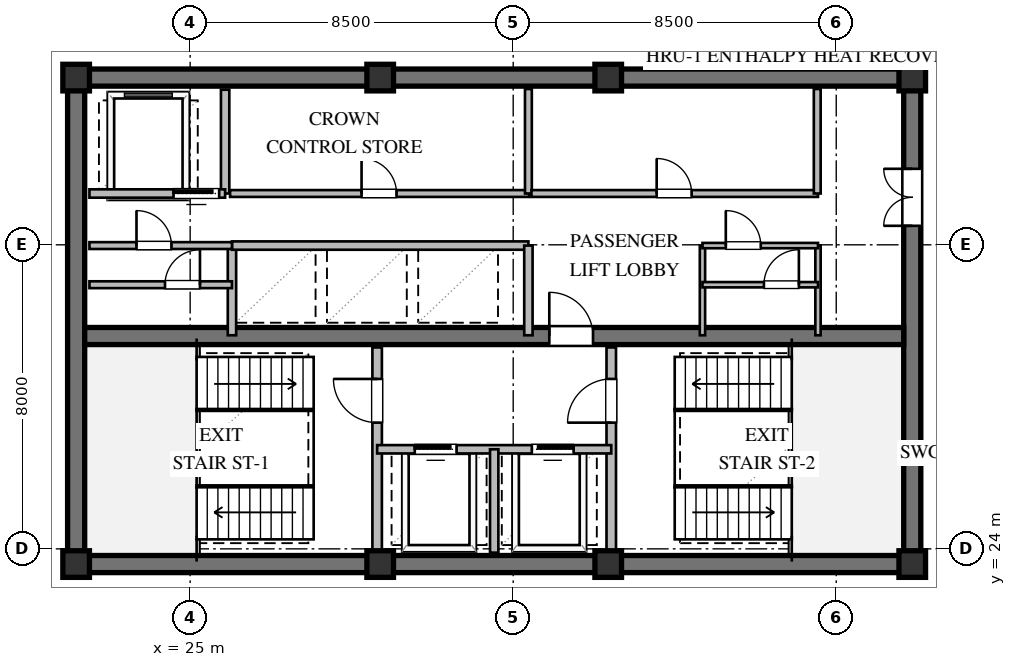
"""IFC4 building model, lengths in metres.
Left out: names, types, materials, properties, quantities, classifications, styles, units other than length and angle.
Written with IfcOpenShell. Run it as: python <this file> out.ifc"""

import sys

from ifc_helpers import new_model, si_unit, direction, frame, frame_2d, origin, origin_2d, place, context, subcontext, project, spatial, rectangle, extrude, element, fill, save


model = new_model("IFC4")
c1 = context("Model", 3, precision=1e-05, world=origin(), true_north=direction((0.0, 1.0)))
c2 = subcontext(c1, "Body", "Model", "MODEL_VIEW")
j1 = project(units=[si_unit("LENGTHUNIT", "METRE"), si_unit("PLANEANGLEUNIT", "RADIAN")], contexts=[c1])
p1 = place(None, origin())
s1 = spatial("IfcSite", under=j1, at=p1, CompositionType="ELEMENT")
p2 = place(p1, origin())
s2 = spatial("IfcBuilding", under=s1, at=p2, CompositionType="ELEMENT")
p3 = place(p2, frame((0.0, 0.0, 292.8)))
s3 = spatial("IfcBuildingStorey", under=s2, at=p3, CompositionType="ELEMENT", Elevation=292.8)
for number, where, z_axis, x_axis in (
    (1, (21.775, 23.6, 0.0), (0.0, 0.0, 1.0), (1.0, 0.0, 0.0)),
    (2, (21.775, 36.4, 0.0), (0.0, 0.0, 1.0), (1.0, 0.0, 0.0)),
):
    element("IfcWall", number, at=place(p3, frame(where, z_axis=z_axis, x_axis=x_axis)), inside=s3, PredefinedType="SHEAR", context=c2, shape_type="SweptSolid", body=[
        extrude(rectangle(XDim=22.45, YDim=0.45, at=frame_2d((11.225, 0.0))), origin(), (0.0, 0.0, 1.0), 3.72),
    ])
p4 = place(p3, frame((22.0, 23.825, 0.0), z_axis=(0.0, 0.0, 1.0), x_axis=(0.0, 1.0, 0.0)))
e3 = element("IfcWall", 3, at=p4, inside=s3, PredefinedType="SHEAR", context=c2, shape_type="SweptSolid", body=[
    extrude(rectangle(XDim=12.35, YDim=0.45, at=frame_2d((6.175, 0.0))), origin(), (0.0, 0.0, 1.0), 3.72),
])
p5 = place(p3, frame((44.0, 23.825, 0.0), z_axis=(0.0, 0.0, 1.0), x_axis=(0.0, 1.0, 0.0)))
e4 = element("IfcWall", 4, at=p5, inside=s3, PredefinedType="SHEAR", context=c2, shape_type="SweptSolid", body=[
    extrude(rectangle(XDim=12.35, YDim=0.45, at=frame_2d((6.175, 0.0))), origin(), (0.0, 0.0, 1.0), 3.72),
])
p6 = place(p5, frame((8.675, 0.0, 0.0)))
e5 = element("IfcOpeningElement", 5, at=p6, cuts=e4, PredefinedType="OPENING", context=c2, shape_type="SweptSolid", body=[
    extrude(rectangle(XDim=1.5, YDim=2.15, at=frame_2d((0.75, 1.075))), frame((0.0, 0.235, 0.0), z_axis=(0.0, -1.0, 0.0), x_axis=(1.0, 0.0, 0.0)), (0.0, 0.0, 1.0), 0.47),
])
p7 = place(p3, frame((22.225, 29.6, 0.0), z_axis=(0.0, 0.0, 1.0), x_axis=(1.0, 0.0, 0.0)))
e6 = element("IfcWall", 6, at=p7, inside=s3, PredefinedType="SHEAR", context=c2, shape_type="SweptSolid", body=[
    extrude(rectangle(XDim=21.55, YDim=0.45, at=frame_2d((10.775, 0.0))), origin(), (0.0, 0.0, 1.0), 3.72),
])
p8 = place(p7, frame((12.225, 0.0, 0.0)))
e7 = element("IfcOpeningElement", 7, at=p8, cuts=e6, PredefinedType="OPENING", context=c2, shape_type="SweptSolid", body=[
    extrude(rectangle(XDim=1.15, YDim=2.1, at=frame_2d((0.575, 1.05))), frame((0.0, 0.235, 0.0), z_axis=(0.0, -1.0, 0.0), x_axis=(1.0, 0.0, 0.0)), (0.0, 0.0, 1.0), 0.47),
])
for number, where, z_axis, x_axis in (
    (8, (22.0, 23.6, 0.0), (0.0, 0.0, 1.0), (1.0, 0.0, 0.0)),
    (9, (30.0, 23.6, 0.0), (0.0, 0.0, 1.0), (1.0, 0.0, 0.0)),
    (10, (36.0, 23.6, 0.0), (0.0, 0.0, 1.0), (1.0, 0.0, 0.0)),
    (11, (44.0, 23.6, 0.0), (0.0, 0.0, 1.0), (1.0, 0.0, 0.0)),
    (12, (44.0, 36.4, 0.0), (0.0, 0.0, 1.0), (1.0, 0.0, 0.0)),
    (13, (36.0, 36.4, 0.0), (0.0, 0.0, 1.0), (1.0, 0.0, 0.0)),
    (14, (30.0, 36.4, 0.0), (0.0, 0.0, 1.0), (1.0, 0.0, 0.0)),
    (15, (22.0, 36.4, 0.0), (0.0, 0.0, 1.0), (1.0, 0.0, 0.0)),
):
    element("IfcColumn", number, at=place(p3, frame(where, z_axis=z_axis, x_axis=x_axis)), inside=s3, PredefinedType="COLUMN", context=c2, shape_type="SweptSolid", body=[
        extrude(rectangle(XDim=0.7, YDim=0.7, at=origin_2d()), origin(), (0.0, 0.0, 1.0), 4.0),
    ])
p9 = place(p3, frame((29.92, 23.9, 0.0), z_axis=(0.0, 0.0, 1.0), x_axis=(0.0, 1.0, 0.0)))
e16 = element("IfcWall", 16, at=p9, inside=s3, PredefinedType="SOLIDWALL", context=c2, shape_type="SweptSolid", body=[
    extrude(rectangle(XDim=5.4, YDim=0.25, at=frame_2d((2.7, 0.0))), origin(), (0.0, 0.0, 1.0), 3.72),
])
p10 = place(p9, frame((3.421, 0.0, 0.0)))
e17 = element("IfcOpeningElement", 17, at=p10, cuts=e16, PredefinedType="OPENING", context=c2, shape_type="SweptSolid", body=[
    extrude(rectangle(XDim=1.15, YDim=2.1, at=frame_2d((0.575, 1.05))), frame((0.0, 0.135, 0.0), z_axis=(0.0, -1.0, 0.0), x_axis=(1.0, 0.0, 0.0)), (0.0, 0.0, 1.0), 0.27),
])
p11 = place(p3, frame((36.08, 23.9, 0.0), z_axis=(0.0, 0.0, 1.0), x_axis=(0.0, 1.0, 0.0)))
e18 = element("IfcWall", 18, at=p11, inside=s3, PredefinedType="SOLIDWALL", context=c2, shape_type="SweptSolid", body=[
    extrude(rectangle(XDim=5.4, YDim=0.25, at=frame_2d((2.7, 0.0))), origin(), (0.0, 0.0, 1.0), 3.72),
])
p12 = place(p11, frame((3.421, 0.0, 0.0)))
e19 = element("IfcOpeningElement", 19, at=p12, cuts=e18, PredefinedType="OPENING", context=c2, shape_type="SweptSolid", body=[
    extrude(rectangle(XDim=1.15, YDim=2.1, at=frame_2d((0.575, 1.05))), frame((0.0, 0.135, 0.0), z_axis=(0.0, -1.0, 0.0), x_axis=(1.0, 0.0, 0.0)), (0.0, 0.0, 1.0), 0.27),
])
p13 = place(p3, frame((29.92, 26.62, 0.0), z_axis=(0.0, 0.0, 1.0), x_axis=(1.0, 0.0, 0.0)))
e20 = element("IfcWall", 20, at=p13, inside=s3, PredefinedType="SOLIDWALL", context=c2, shape_type="SweptSolid", body=[
    extrude(rectangle(XDim=6.16, YDim=0.22, at=frame_2d((3.08, 0.0))), origin(), (0.0, 0.0, 1.0), 3.72),
])
p14 = place(p13, frame((0.99, 0.0, 0.0)))
e21 = element("IfcOpeningElement", 21, at=p14, cuts=e20, PredefinedType="OPENING", context=c2, shape_type="SweptSolid", body=[
    extrude(rectangle(XDim=1.1, YDim=2.1, at=frame_2d((0.55, 1.05))), frame((0.0, 0.12, 0.0), z_axis=(0.0, -1.0, 0.0), x_axis=(1.0, 0.0, 0.0)), (0.0, 0.0, 1.0), 0.24),
])
p15 = place(p13, frame((4.07, 0.0, 0.0)))
e22 = element("IfcOpeningElement", 22, at=p15, cuts=e20, PredefinedType="OPENING", context=c2, shape_type="SweptSolid", body=[
    extrude(rectangle(XDim=1.1, YDim=2.1, at=frame_2d((0.55, 1.05))), frame((0.0, 0.12, 0.0), z_axis=(0.0, -1.0, 0.0), x_axis=(1.0, 0.0, 0.0)), (0.0, 0.0, 1.0), 0.24),
])
p16 = place(p3, frame((33.0, 23.9, 0.0), z_axis=(0.0, 0.0, 1.0), x_axis=(0.0, 1.0, 0.0)))
e23 = element("IfcWall", 23, at=p16, inside=s3, PredefinedType="SOLIDWALL", context=c2, shape_type="SweptSolid", body=[
    extrude(rectangle(XDim=2.72, YDim=0.22, at=frame_2d((1.36, 0.0))), origin(), (0.0, 0.0, 1.0), 3.72),
])
p17 = place(p3, frame((25.92, 33.35, 0.0), z_axis=(0.0, 0.0, 1.0), x_axis=(0.0, 1.0, 0.0)))
e24 = element("IfcWall", 24, at=p17, inside=s3, PredefinedType="SOLIDWALL", context=c2, shape_type="SweptSolid", body=[
    extrude(rectangle(XDim=2.73, YDim=0.22, at=frame_2d((1.365, 0.0))), origin(), (0.0, 0.0, 1.0), 3.72),
])
p18 = place(p3, frame((22.35, 33.35, 0.0), z_axis=(0.0, 0.0, 1.0), x_axis=(1.0, 0.0, 0.0)))
e25 = element("IfcWall", 25, at=p18, inside=s3, PredefinedType="SOLIDWALL", context=c2, shape_type="SweptSolid", body=[
    extrude(rectangle(XDim=3.57, YDim=0.22, at=frame_2d((1.785, 0.0))), origin(), (0.0, 0.0, 1.0), 3.72),
])
p19 = place(p18, frame((2.213, 0.0, 0.0)))
e26 = element("IfcOpeningElement", 26, at=p19, cuts=e25, PredefinedType="OPENING", context=c2, shape_type="SweptSolid", body=[
    extrude(rectangle(XDim=1.2, YDim=2.1, at=frame_2d((0.6, 1.05))), frame((0.0, 0.12, 0.0), z_axis=(0.0, -1.0, 0.0), x_axis=(1.0, 0.0, 0.0)), (0.0, 0.0, 1.0), 0.24),
])
p20 = place(p3, frame((26.1, 29.62, 0.0), z_axis=(0.0, 0.0, 1.0), x_axis=(0.0, 1.0, 0.0)))
e27 = element("IfcWall", 27, at=p20, inside=s3, PredefinedType="SOLIDWALL", context=c2, shape_type="SweptSolid", body=[
    extrude(rectangle(XDim=2.36, YDim=0.22, at=frame_2d((1.18, 0.0))), origin(), (0.0, 0.0, 1.0), 3.72),
])
p21 = place(p3, frame((26.1, 31.98, 0.0), z_axis=(0.0, 0.0, 1.0), x_axis=(1.0, 0.0, 0.0)))
e28 = element("IfcWall", 28, at=p21, inside=s3, PredefinedType="SOLIDWALL", context=c2, shape_type="SweptSolid", body=[
    extrude(rectangle(XDim=7.8, YDim=0.22, at=frame_2d((3.9, 0.0))), origin(), (0.0, 0.0, 1.0), 3.72),
])
p22 = place(p3, frame((33.9, 29.62, 0.0), z_axis=(0.0, 0.0, 1.0), x_axis=(0.0, 1.0, 0.0)))
e29 = element("IfcWall", 29, at=p22, inside=s3, PredefinedType="SOLIDWALL", context=c2, shape_type="SweptSolid", body=[
    extrude(rectangle(XDim=2.36, YDim=0.22, at=frame_2d((1.18, 0.0))), origin(), (0.0, 0.0, 1.0), 3.72),
])
p23 = place(p3, frame((26.05, 33.35, 0.0), z_axis=(0.0, 0.0, 1.0), x_axis=(1.0, 0.0, 0.0)))
e30 = element("IfcWall", 30, at=p23, inside=s3, PredefinedType="PARTITIONING", context=c2, shape_type="SweptSolid", body=[
    extrude(rectangle(XDim=7.87, YDim=0.18, at=frame_2d((3.935, 0.0))), origin(), (0.0, 0.0, 1.0), 3.72),
])
p24 = place(p23, frame((3.46, 0.0, 0.0)))
e31 = element("IfcOpeningElement", 31, at=p24, cuts=e30, PredefinedType="OPENING", context=c2, shape_type="SweptSolid", body=[
    extrude(rectangle(XDim=0.92, YDim=2.1, at=frame_2d((0.46, 1.05))), frame((0.0, 0.1, 0.0), z_axis=(0.0, -1.0, 0.0), x_axis=(1.0, 0.0, 0.0)), (0.0, 0.0, 1.0), 0.2),
])
p25 = place(p3, frame((33.9, 33.35, 0.0), z_axis=(0.0, 0.0, 1.0), x_axis=(0.0, 1.0, 0.0)))
e32 = element("IfcWall", 32, at=p25, inside=s3, PredefinedType="PARTITIONING", context=c2, shape_type="SweptSolid", body=[
    extrude(rectangle(XDim=2.75, YDim=0.18, at=frame_2d((1.375, 0.0))), origin(), (0.0, 0.0, 1.0), 3.72),
])
p26 = place(p3, frame((33.98, 33.35, 0.0), z_axis=(0.0, 0.0, 1.0), x_axis=(1.0, 0.0, 0.0)))
e33 = element("IfcWall", 33, at=p26, inside=s3, PredefinedType="PARTITIONING", context=c2, shape_type="SweptSolid", body=[
    extrude(rectangle(XDim=7.54, YDim=0.18, at=frame_2d((3.77, 0.0))), origin(), (0.0, 0.0, 1.0), 3.72),
])
p27 = place(p26, frame((3.295, 0.0, 0.0)))
e34 = element("IfcOpeningElement", 34, at=p27, cuts=e33, PredefinedType="OPENING", context=c2, shape_type="SweptSolid", body=[
    extrude(rectangle(XDim=0.92, YDim=2.1, at=frame_2d((0.46, 1.05))), frame((0.0, 0.1, 0.0), z_axis=(0.0, -1.0, 0.0), x_axis=(1.0, 0.0, 0.0)), (0.0, 0.0, 1.0), 0.2),
])
p28 = place(p3, frame((41.5, 33.35, 0.0), z_axis=(0.0, 0.0, 1.0), x_axis=(0.0, 1.0, 0.0)))
e35 = element("IfcWall", 35, at=p28, inside=s3, PredefinedType="PARTITIONING", context=c2, shape_type="SweptSolid", body=[
    extrude(rectangle(XDim=2.75, YDim=0.18, at=frame_2d((1.375, 0.0))), origin(), (0.0, 0.0, 1.0), 3.72),
])
p29 = place(p3, frame((22.35, 30.95, 0.0), z_axis=(0.0, 0.0, 1.0), x_axis=(1.0, 0.0, 0.0)))
e36 = element("IfcWall", 36, at=p29, inside=s3, PredefinedType="PARTITIONING", context=c2, shape_type="SweptSolid", body=[
    extrude(rectangle(XDim=3.75, YDim=0.18, at=frame_2d((1.875, 0.0))), origin(), (0.0, 0.0, 1.0), 3.72),
])
p30 = place(p29, frame((1.988, 0.0, 0.0)))
e37 = element("IfcOpeningElement", 37, at=p30, cuts=e36, PredefinedType="OPENING", context=c2, shape_type="SweptSolid", body=[
    extrude(rectangle(XDim=0.92, YDim=2.1, at=frame_2d((0.46, 1.05))), frame((0.0, 0.1, 0.0), z_axis=(0.0, -1.0, 0.0), x_axis=(1.0, 0.0, 0.0)), (0.0, 0.0, 1.0), 0.2),
])
p31 = place(p3, frame((22.35, 31.98, 0.0), z_axis=(0.0, 0.0, 1.0), x_axis=(1.0, 0.0, 0.0)))
e38 = element("IfcWall", 38, at=p31, inside=s3, PredefinedType="PARTITIONING", context=c2, shape_type="SweptSolid", body=[
    extrude(rectangle(XDim=3.75, YDim=0.18, at=frame_2d((1.875, 0.0))), origin(), (0.0, 0.0, 1.0), 3.72),
])
p32 = place(p31, frame((1.238, 0.0, 0.0)))
e39 = element("IfcOpeningElement", 39, at=p32, cuts=e38, PredefinedType="OPENING", context=c2, shape_type="SweptSolid", body=[
    extrude(rectangle(XDim=0.92, YDim=2.1, at=frame_2d((0.46, 1.05))), frame((0.0, 0.1, 0.0), z_axis=(0.0, -1.0, 0.0), x_axis=(1.0, 0.0, 0.0)), (0.0, 0.0, 1.0), 0.2),
])
for number, where, z_axis, x_axis in (
    (40, (38.48, 29.62, 0.0), (0.0, 0.0, 1.0), (0.0, 1.0, 0.0)),
    (41, (41.52, 29.62, 0.0), (0.0, 0.0, 1.0), (0.0, 1.0, 0.0)),
):
    element("IfcWall", number, at=place(p3, frame(where, z_axis=z_axis, x_axis=x_axis)), inside=s3, PredefinedType="PARTITIONING", context=c2, shape_type="SweptSolid", body=[
        extrude(rectangle(XDim=2.36, YDim=0.14, at=frame_2d((1.18, 0.0))), origin(), (0.0, 0.0, 1.0), 3.72),
    ])
p33 = place(p3, frame((38.48, 30.95, 0.0), z_axis=(0.0, 0.0, 1.0), x_axis=(1.0, 0.0, 0.0)))
e42 = element("IfcWall", 42, at=p33, inside=s3, PredefinedType="PARTITIONING", context=c2, shape_type="SweptSolid", body=[
    extrude(rectangle(XDim=3.04, YDim=0.14, at=frame_2d((1.52, 0.0))), origin(), (0.0, 0.0, 1.0), 3.72),
])
p34 = place(p33, frame((1.617, 0.0, 0.0)))
e43 = element("IfcOpeningElement", 43, at=p34, cuts=e42, PredefinedType="OPENING", context=c2, shape_type="SweptSolid", body=[
    extrude(rectangle(XDim=0.92, YDim=2.1, at=frame_2d((0.46, 1.05))), frame((0.0, 0.08, 0.0), z_axis=(0.0, -1.0, 0.0), x_axis=(1.0, 0.0, 0.0)), (0.0, 0.0, 1.0), 0.16),
])
p35 = place(p3, frame((38.48, 31.98, 0.0), z_axis=(0.0, 0.0, 1.0), x_axis=(1.0, 0.0, 0.0)))
e44 = element("IfcWall", 44, at=p35, inside=s3, PredefinedType="PARTITIONING", context=c2, shape_type="SweptSolid", body=[
    extrude(rectangle(XDim=3.04, YDim=0.14, at=frame_2d((1.52, 0.0))), origin(), (0.0, 0.0, 1.0), 3.72),
])
p36 = place(p35, frame((0.614, 0.0, 0.0)))
e45 = element("IfcOpeningElement", 45, at=p36, cuts=e44, PredefinedType="OPENING", context=c2, shape_type="SweptSolid", body=[
    extrude(rectangle(XDim=0.92, YDim=2.1, at=frame_2d((0.46, 1.05))), frame((0.0, 0.08, 0.0), z_axis=(0.0, -1.0, 0.0), x_axis=(1.0, 0.0, 0.0)), (0.0, 0.0, 1.0), 0.16),
])
p37 = place(p10, origin())
e46 = element("IfcDoor", 46, at=p37, inside=s3, OperationType="SINGLE_SWING_RIGHT", PredefinedType="DOOR", context=c2, shape_type="SweptSolid", body=[
    extrude(rectangle(XDim=1.15, YDim=2.1, at=frame_2d((0.575, 1.05))), frame((0.0, 0.025, 0.0), z_axis=(0.0, -1.0, 0.0), x_axis=(1.0, 0.0, 0.0)), (0.0, 0.0, 1.0), 0.05),
])
fill(e17, e46)
p38 = place(p12, origin())
e47 = element("IfcDoor", 47, at=p38, inside=s3, OperationType="SINGLE_SWING_LEFT", PredefinedType="DOOR", context=c2, shape_type="SweptSolid", body=[
    extrude(rectangle(XDim=1.15, YDim=2.1, at=frame_2d((0.575, 1.05))), frame((0.0, 0.025, 0.0), z_axis=(0.0, -1.0, 0.0), x_axis=(1.0, 0.0, 0.0)), (0.0, 0.0, 1.0), 0.05),
])
fill(e19, e47)
p39 = place(p14, origin())
e48 = element("IfcDoor", 48, at=p39, inside=s3, OperationType="SLIDING_TO_LEFT", PredefinedType="DOOR", context=c2, shape_type="SweptSolid", body=[
    extrude(rectangle(XDim=1.1, YDim=2.1, at=frame_2d((0.55, 1.05))), frame((0.0, 0.025, 0.0), z_axis=(0.0, -1.0, 0.0), x_axis=(1.0, 0.0, 0.0)), (0.0, 0.0, 1.0), 0.05),
])
fill(e21, e48)
p40 = place(p15, origin())
e49 = element("IfcDoor", 49, at=p40, inside=s3, OperationType="SLIDING_TO_RIGHT", PredefinedType="DOOR", context=c2, shape_type="SweptSolid", body=[
    extrude(rectangle(XDim=1.1, YDim=2.1, at=frame_2d((0.55, 1.05))), frame((0.0, 0.025, 0.0), z_axis=(0.0, -1.0, 0.0), x_axis=(1.0, 0.0, 0.0)), (0.0, 0.0, 1.0), 0.05),
])
fill(e22, e49)
p41 = place(p8, origin())
e50 = element("IfcDoor", 50, at=p41, inside=s3, OperationType="SINGLE_SWING_LEFT", PredefinedType="DOOR", context=c2, shape_type="SweptSolid", body=[
    extrude(rectangle(XDim=1.15, YDim=2.1, at=frame_2d((0.575, 1.05))), frame((0.0, 0.025, 0.0), z_axis=(0.0, -1.0, 0.0), x_axis=(1.0, 0.0, 0.0)), (0.0, 0.0, 1.0), 0.05),
])
fill(e7, e50)
p42 = place(p6, origin())
e51 = element("IfcDoor", 51, at=p42, inside=s3, OperationType="DOUBLE_DOOR_SINGLE_SWING", PredefinedType="DOOR", context=c2, shape_type="SweptSolid", body=[
    extrude(rectangle(XDim=1.5, YDim=2.15, at=frame_2d((0.75, 1.075))), frame((0.0, 0.025, 0.0), z_axis=(0.0, -1.0, 0.0), x_axis=(1.0, 0.0, 0.0)), (0.0, 0.0, 1.0), 0.05),
])
fill(e5, e51)
p43 = place(p19, origin())
e52 = element("IfcDoor", 52, at=p43, inside=s3, OperationType="SLIDING_TO_LEFT", PredefinedType="DOOR", context=c2, shape_type="SweptSolid", body=[
    extrude(rectangle(XDim=1.2, YDim=2.1, at=frame_2d((0.6, 1.05))), frame((0.0, 0.025, 0.0), z_axis=(0.0, -1.0, 0.0), x_axis=(1.0, 0.0, 0.0)), (0.0, 0.0, 1.0), 0.05),
])
fill(e26, e52)
p44 = place(p24, origin())
e53 = element("IfcDoor", 53, at=p44, inside=s3, OperationType="SINGLE_SWING_LEFT", PredefinedType="DOOR", context=c2, shape_type="SweptSolid", body=[
    extrude(rectangle(XDim=0.92, YDim=2.1, at=frame_2d((0.46, 1.05))), frame((0.0, 0.025, 0.0), z_axis=(0.0, -1.0, 0.0), x_axis=(1.0, 0.0, 0.0)), (0.0, 0.0, 1.0), 0.05),
])
fill(e31, e53)
p45 = place(p27, origin())
e54 = element("IfcDoor", 54, at=p45, inside=s3, OperationType="SINGLE_SWING_LEFT", PredefinedType="DOOR", context=c2, shape_type="SweptSolid", body=[
    extrude(rectangle(XDim=0.92, YDim=2.1, at=frame_2d((0.46, 1.05))), frame((0.0, 0.025, 0.0), z_axis=(0.0, -1.0, 0.0), x_axis=(1.0, 0.0, 0.0)), (0.0, 0.0, 1.0), 0.05),
])
fill(e34, e54)
p46 = place(p32, origin())
e55 = element("IfcDoor", 55, at=p46, inside=s3, OperationType="SINGLE_SWING_LEFT", PredefinedType="DOOR", context=c2, shape_type="SweptSolid", body=[
    extrude(rectangle(XDim=0.92, YDim=2.1, at=frame_2d((0.46, 1.05))), frame((0.0, 0.025, 0.0), z_axis=(0.0, -1.0, 0.0), x_axis=(1.0, 0.0, 0.0)), (0.0, 0.0, 1.0), 0.05),
])
fill(e39, e55)
p47 = place(p30, origin())
e56 = element("IfcDoor", 56, at=p47, inside=s3, OperationType="SINGLE_SWING_RIGHT", PredefinedType="DOOR", context=c2, shape_type="SweptSolid", body=[
    extrude(rectangle(XDim=0.92, YDim=2.1, at=frame_2d((0.46, 1.05))), frame((0.0, 0.025, 0.0), z_axis=(0.0, -1.0, 0.0), x_axis=(1.0, 0.0, 0.0)), (0.0, 0.0, 1.0), 0.05),
])
fill(e37, e56)
p48 = place(p36, origin())
e57 = element("IfcDoor", 57, at=p48, inside=s3, OperationType="SINGLE_SWING_LEFT", PredefinedType="DOOR", context=c2, shape_type="SweptSolid", body=[
    extrude(rectangle(XDim=0.92, YDim=2.1, at=frame_2d((0.46, 1.05))), frame((0.0, 0.025, 0.0), z_axis=(0.0, -1.0, 0.0), x_axis=(1.0, 0.0, 0.0)), (0.0, 0.0, 1.0), 0.05),
])
fill(e45, e57)
p49 = place(p34, origin())
e58 = element("IfcDoor", 58, at=p49, inside=s3, OperationType="SINGLE_SWING_RIGHT", PredefinedType="DOOR", context=c2, shape_type="SweptSolid", body=[
    extrude(rectangle(XDim=0.92, YDim=2.1, at=frame_2d((0.46, 1.05))), frame((0.0, 0.025, 0.0), z_axis=(0.0, -1.0, 0.0), x_axis=(1.0, 0.0, 0.0)), (0.0, 0.0, 1.0), 0.05),
])
fill(e43, e58)
save(model, sys.argv[1])
